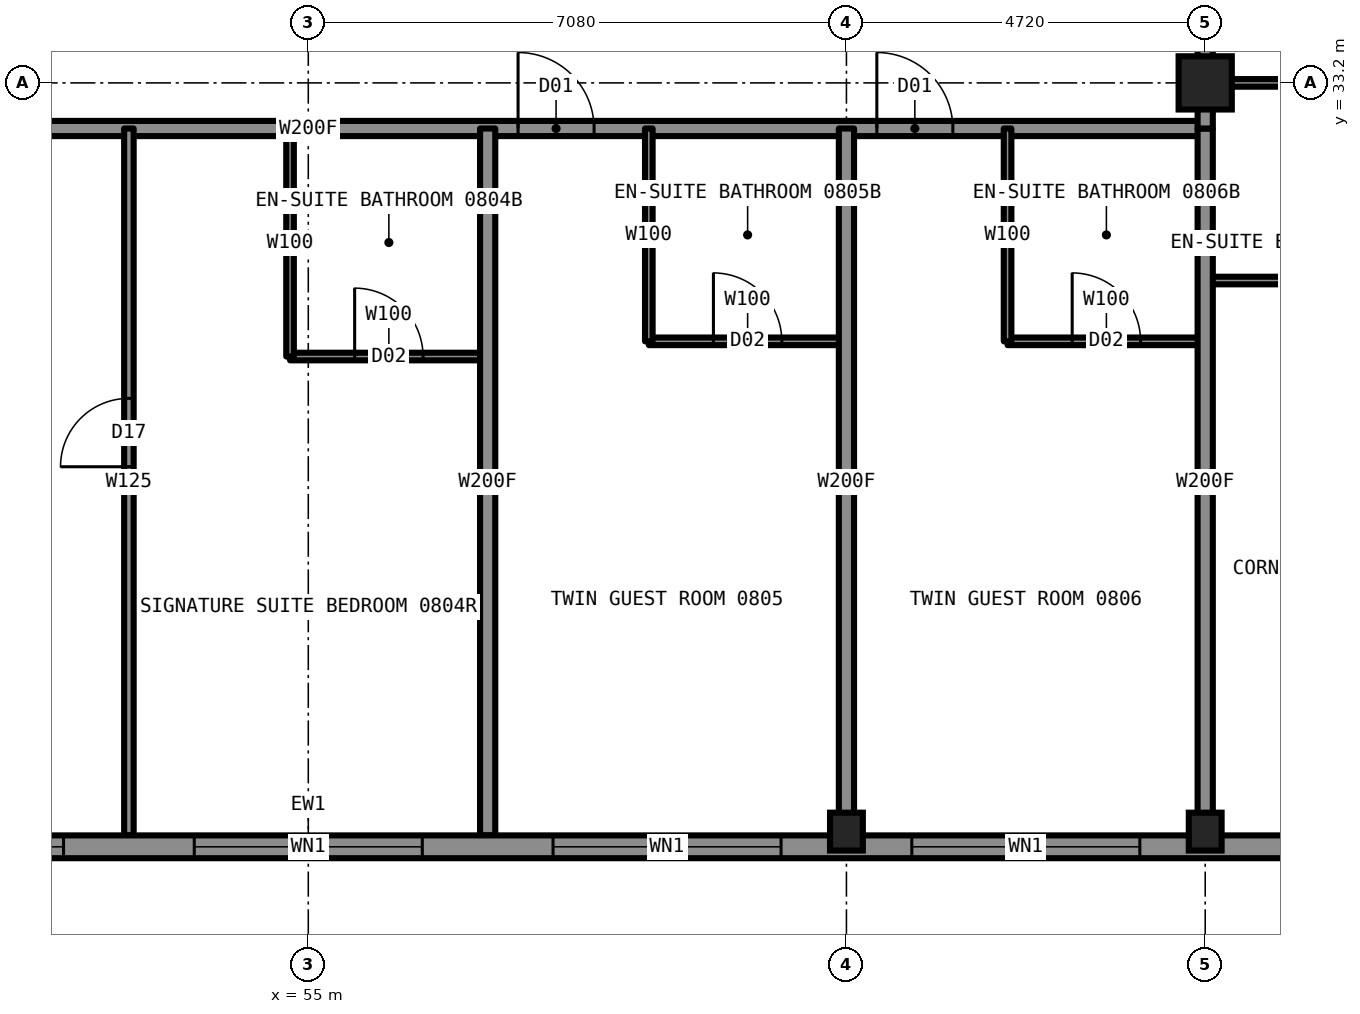
"""IFC4 building model, lengths in metres.
Left out: names, types, materials, properties, quantities, classifications, styles, units other than length and angle.
Written with IfcOpenShell. Run it as: python <this file> out.ifc"""

import sys

from ifc_helpers import new_model, si_unit, direction, frame, frame_2d, origin, origin_2d, place, context, subcontext, project, spatial, rectangle, hollow_rectangle, i_section, extrude, element, fill, save


model = new_model("IFC4")
c1 = context("Model", 3, precision=1e-05, world=origin(), true_north=direction((0.0, 1.0)))
c2 = subcontext(c1, "Body", "Model", "MODEL_VIEW")
j1 = project(units=[si_unit("LENGTHUNIT", "METRE"), si_unit("PLANEANGLEUNIT", "RADIAN")], contexts=[c1])
p1 = place(None, origin())
s1 = spatial("IfcSite", under=j1, at=p1, CompositionType="ELEMENT")
p2 = place(p1, origin())
s2 = spatial("IfcBuilding", under=s1, at=p2, CompositionType="ELEMENT")
p3 = place(p2, frame((0.0, 0.0, 28.5)))
s3 = spatial("IfcBuildingStorey", under=s2, at=p3, CompositionType="ELEMENT", Elevation=28.5)
for number, where, z_axis, x_axis in (
    (1, (62.08, 23.35, 0.0), (0.0, 0.0, 1.0), (1.0, 0.0, 0.0)),
    (2, (66.8, 23.35, 0.0), (0.0, 0.0, 1.0), (1.0, 0.0, 0.0)),
):
    element("IfcColumn", number, at=place(p3, frame(where, z_axis=z_axis, x_axis=x_axis)), inside=s3, PredefinedType="COLUMN", context=c2, shape_type="SweptSolid", body=[
        extrude(i_section(OverallWidth=0.432, OverallDepth=0.498, WebThickness=0.056, FlangeThickness=0.089, at=origin_2d()), origin(), (0.0, 0.0, 1.0), 3.5),
    ])
p4 = place(p3, frame((66.8, 33.2, 0.0), z_axis=(0.0, 0.0, 1.0), x_axis=(1.0, 0.0, 0.0)))
e3 = element("IfcColumn", 3, at=p4, inside=s3, PredefinedType="COLUMN", context=c2, shape_type="SweptSolid", body=[
    extrude(hollow_rectangle(XDim=0.7, YDim=0.7, WallThickness=0.06, at=origin_2d()), origin(), (0.0, 0.0, 1.0), 3.5),
])
p5 = place(p3, frame((66.8, 33.2, 0.0), z_axis=(0.0, 0.0, 1.0), x_axis=(1.0, 0.0, 0.0)))
e4 = element("IfcWall", 4, at=p5, inside=s3, PredefinedType="PARTITIONING", context=c2, shape_type="SweptSolid", body=[
    extrude(rectangle(XDim=2.6, YDim=0.1, at=frame_2d((1.3, 0.0))), origin(), (0.0, 0.0, 1.0), 2.573),
])
p6 = place(p3, frame((43.2, 32.6, 0.0), z_axis=(0.0, 0.0, 1.0), x_axis=(1.0, 0.0, 0.0)))
e5 = element("IfcWall", 5, at=p6, inside=s3, PredefinedType="PARTITIONING", context=c2, shape_type="SweptSolid", body=[
    extrude(rectangle(XDim=23.6, YDim=0.2, at=frame_2d((11.8, 0.0))), origin(), (0.0, 0.0, 1.0), 3.33),
])
p7 = place(p6, frame((1.85, 0.0, 0.0)))
e6 = element("IfcOpeningElement", 6, at=p7, cuts=e5, PredefinedType="OPENING", context=c2, shape_type="SweptSolid", body=[
    extrude(rectangle(XDim=1.1, YDim=2.2, at=frame_2d((0.55, 1.1))), frame((0.0, 0.11, 0.0), z_axis=(0.0, -1.0, 0.0), x_axis=(1.0, 0.0, 0.0)), (0.0, 0.0, 1.0), 0.22),
])
p8 = place(p6, frame((14.56, 0.0, 0.0)))
e7 = element("IfcOpeningElement", 7, at=p8, cuts=e5, PredefinedType="OPENING", context=c2, shape_type="SweptSolid", body=[
    extrude(rectangle(XDim=1.0, YDim=2.2, at=frame_2d((0.5, 1.1))), frame((0.0, 0.11, 0.0), z_axis=(0.0, -1.0, 0.0), x_axis=(1.0, 0.0, 0.0)), (0.0, 0.0, 1.0), 0.22),
])
p9 = place(p6, frame((19.28, 0.0, 0.0)))
e8 = element("IfcOpeningElement", 8, at=p9, cuts=e5, PredefinedType="OPENING", context=c2, shape_type="SweptSolid", body=[
    extrude(rectangle(XDim=1.0, YDim=2.2, at=frame_2d((0.5, 1.1))), frame((0.0, 0.11, 0.0), z_axis=(0.0, -1.0, 0.0), x_axis=(1.0, 0.0, 0.0)), (0.0, 0.0, 1.0), 0.22),
])
p10 = place(p3, frame((66.8, 30.6, 0.0), z_axis=(0.0, 0.0, 1.0), x_axis=(1.0, 0.0, 0.0)))
e9 = element("IfcWall", 9, at=p10, inside=s3, PredefinedType="PARTITIONING", context=c2, shape_type="SweptSolid", body=[
    extrude(rectangle(XDim=2.6, YDim=0.1, at=frame_2d((1.3, 0.0))), origin(), (0.0, 0.0, 1.0), 3.33),
])
p11 = place(p3, frame((59.48, 29.8, 0.0), z_axis=(0.0, 0.0, 1.0), x_axis=(1.0, 0.0, 0.0)))
e10 = element("IfcWall", 10, at=p11, inside=s3, PredefinedType="PARTITIONING", context=c2, shape_type="SweptSolid", body=[
    extrude(rectangle(XDim=2.6, YDim=0.1, at=frame_2d((1.3, 0.0))), origin(), (0.0, 0.0, 1.0), 3.33),
])
p12 = place(p11, frame((0.85, 0.0, 0.0)))
e11 = element("IfcOpeningElement", 11, at=p12, cuts=e10, PredefinedType="OPENING", context=c2, shape_type="SweptSolid", body=[
    extrude(rectangle(XDim=0.9, YDim=2.1, at=frame_2d((0.45, 1.05))), frame((0.0, 0.06, 0.0), z_axis=(0.0, -1.0, 0.0), x_axis=(1.0, 0.0, 0.0)), (0.0, 0.0, 1.0), 0.12),
])
p13 = place(p3, frame((64.2, 29.8, 0.0), z_axis=(0.0, 0.0, 1.0), x_axis=(1.0, 0.0, 0.0)))
e12 = element("IfcWall", 12, at=p13, inside=s3, PredefinedType="PARTITIONING", context=c2, shape_type="SweptSolid", body=[
    extrude(rectangle(XDim=2.6, YDim=0.1, at=frame_2d((1.3, 0.0))), origin(), (0.0, 0.0, 1.0), 3.33),
])
p14 = place(p13, frame((0.85, 0.0, 0.0)))
e13 = element("IfcOpeningElement", 13, at=p14, cuts=e12, PredefinedType="OPENING", context=c2, shape_type="SweptSolid", body=[
    extrude(rectangle(XDim=0.9, YDim=2.1, at=frame_2d((0.45, 1.05))), frame((0.0, 0.06, 0.0), z_axis=(0.0, -1.0, 0.0), x_axis=(1.0, 0.0, 0.0)), (0.0, 0.0, 1.0), 0.12),
])
p15 = place(p3, frame((54.76, 29.6, 0.0), z_axis=(0.0, 0.0, 1.0), x_axis=(1.0, 0.0, 0.0)))
e14 = element("IfcWall", 14, at=p15, inside=s3, PredefinedType="PARTITIONING", context=c2, shape_type="SweptSolid", body=[
    extrude(rectangle(XDim=2.6, YDim=0.1, at=frame_2d((1.3, 0.0))), origin(), (0.0, 0.0, 1.0), 3.33),
])
p16 = place(p15, frame((0.85, 0.0, 0.0)))
e15 = element("IfcOpeningElement", 15, at=p16, cuts=e14, PredefinedType="OPENING", context=c2, shape_type="SweptSolid", body=[
    extrude(rectangle(XDim=0.9, YDim=2.1, at=frame_2d((0.45, 1.05))), frame((0.0, 0.06, 0.0), z_axis=(0.0, -1.0, 0.0), x_axis=(1.0, 0.0, 0.0)), (0.0, 0.0, 1.0), 0.12),
])
p17 = place(p3, frame((54.76, 29.6, 0.0), z_axis=(0.0, 0.0, 1.0), x_axis=(0.0, 1.0, 0.0)))
e16 = element("IfcWall", 16, at=p17, inside=s3, PredefinedType="PARTITIONING", context=c2, shape_type="SweptSolid", body=[
    extrude(rectangle(XDim=3.0, YDim=0.1, at=frame_2d((1.5, 0.0))), origin(), (0.0, 0.0, 1.0), 3.33),
])
p18 = place(p3, frame((52.64, 23.3, 0.0), z_axis=(0.0, 0.0, 1.0), x_axis=(0.0, 1.0, 0.0)))
e17 = element("IfcWall", 17, at=p18, inside=s3, PredefinedType="PARTITIONING", context=c2, shape_type="SweptSolid", body=[
    extrude(rectangle(XDim=9.3, YDim=0.125, at=frame_2d((4.65, 0.0))), origin(), (0.0, 0.0, 1.0), 3.33),
])
p19 = place(p18, frame((4.85, 0.0, 0.0)))
e18 = element("IfcOpeningElement", 18, at=p19, cuts=e17, PredefinedType="OPENING", context=c2, shape_type="SweptSolid", body=[
    extrude(rectangle(XDim=0.9, YDim=2.2, at=frame_2d((0.45, 1.1))), frame((0.0, 0.073, 0.0), z_axis=(0.0, -1.0, 0.0), x_axis=(1.0, 0.0, 0.0)), (0.0, 0.0, 1.0), 0.145),
])
p20 = place(p3, frame((66.8, 33.22, 0.0), z_axis=(0.0, 0.0, 1.0), x_axis=(0.0, 1.0, 0.0)))
e19 = element("IfcWall", 19, at=p20, inside=s3, PredefinedType="PARTITIONING", context=c2, shape_type="SweptSolid", body=[
    extrude(rectangle(XDim=23.56, YDim=0.2, at=frame_2d((11.78, 0.0))), origin(), (0.0, 0.0, 1.0), 3.33),
])
p21 = place(p20, frame((7.85, 0.0, 0.0)))
e20 = element("IfcOpeningElement", 20, at=p21, cuts=e19, PredefinedType="OPENING", context=c2, shape_type="SweptSolid", body=[
    extrude(rectangle(XDim=1.0, YDim=2.2, at=frame_2d((0.5, 1.1))), frame((0.0, 0.11, 0.0), z_axis=(0.0, -1.0, 0.0), x_axis=(1.0, 0.0, 0.0)), (0.0, 0.0, 1.0), 0.22),
])
p22 = place(p20, frame((12.42, 0.0, 0.0)))
e21 = element("IfcOpeningElement", 21, at=p22, cuts=e19, PredefinedType="OPENING", context=c2, shape_type="SweptSolid", body=[
    extrude(rectangle(XDim=1.0, YDim=2.2, at=frame_2d((0.5, 1.1))), frame((0.0, 0.11, 0.0), z_axis=(0.0, -1.0, 0.0), x_axis=(1.0, 0.0, 0.0)), (0.0, 0.0, 1.0), 0.22),
])
p23 = place(p20, frame((21.83, 0.0, 0.0)))
e22 = element("IfcOpeningElement", 22, at=p23, cuts=e19, PredefinedType="OPENING", context=c2, shape_type="SweptSolid", body=[
    extrude(rectangle(XDim=1.1, YDim=2.2, at=frame_2d((0.55, 1.1))), frame((0.0, 0.11, 0.0), z_axis=(0.0, -1.0, 0.0), x_axis=(1.0, 0.0, 0.0)), (0.0, 0.0, 1.0), 0.22),
])
p24 = place(p20, frame((0.63, 0.0, 0.0)))
e23 = element("IfcOpeningElement", 23, at=p24, cuts=e19, PredefinedType="OPENING", context=c2, shape_type="SweptSolid", body=[
    extrude(rectangle(XDim=1.1, YDim=2.2, at=frame_2d((0.55, 1.1))), frame((0.0, 0.11, 0.0), z_axis=(0.0, -1.0, 0.0), x_axis=(1.0, 0.0, 0.0)), (0.0, 0.0, 1.0), 0.22),
])
p25 = place(p3, frame((66.8, 23.3, 0.0), z_axis=(0.0, 0.0, 1.0), x_axis=(0.0, 1.0, 0.0)))
e24 = element("IfcWall", 24, at=p25, inside=s3, PredefinedType="PARTITIONING", context=c2, shape_type="SweptSolid", body=[
    extrude(rectangle(XDim=9.3, YDim=0.2, at=frame_2d((4.65, 0.0))), origin(), (0.0, 0.0, 1.0), 2.573),
])
p26 = place(p3, frame((57.36, 23.3, 0.0), z_axis=(0.0, 0.0, 1.0), x_axis=(0.0, 1.0, 0.0)))
e25 = element("IfcWall", 25, at=p26, inside=s3, PredefinedType="PARTITIONING", context=c2, shape_type="SweptSolid", body=[
    extrude(rectangle(XDim=9.3, YDim=0.2, at=frame_2d((4.65, 0.0))), origin(), (0.0, 0.0, 1.0), 3.33),
])
p27 = place(p3, frame((59.48, 29.8, 0.0), z_axis=(0.0, 0.0, 1.0), x_axis=(0.0, 1.0, 0.0)))
e26 = element("IfcWall", 26, at=p27, inside=s3, PredefinedType="PARTITIONING", context=c2, shape_type="SweptSolid", body=[
    extrude(rectangle(XDim=2.8, YDim=0.1, at=frame_2d((1.4, 0.0))), origin(), (0.0, 0.0, 1.0), 3.33),
])
p28 = place(p3, frame((62.08, 23.3, 0.0), z_axis=(0.0, 0.0, 1.0), x_axis=(0.0, 1.0, 0.0)))
e27 = element("IfcWall", 27, at=p28, inside=s3, PredefinedType="PARTITIONING", context=c2, shape_type="SweptSolid", body=[
    extrude(rectangle(XDim=9.3, YDim=0.2, at=frame_2d((4.65, 0.0))), origin(), (0.0, 0.0, 1.0), 2.573),
])
p29 = place(p3, frame((64.2, 29.8, 0.0), z_axis=(0.0, 0.0, 1.0), x_axis=(0.0, 1.0, 0.0)))
e28 = element("IfcWall", 28, at=p29, inside=s3, PredefinedType="PARTITIONING", context=c2, shape_type="SweptSolid", body=[
    extrude(rectangle(XDim=2.8, YDim=0.1, at=frame_2d((1.4, 0.0))), origin(), (0.0, 0.0, 1.0), 3.33),
])
p30 = place(p3, frame((38.5, 23.15, 0.0), z_axis=(0.0, 0.0, 1.0), x_axis=(1.0, 0.0, 0.0)))
e29 = element("IfcWall", 29, at=p30, inside=s3, PredefinedType="SOLIDWALL", context=c2, shape_type="SweptSolid", body=[
    extrude(rectangle(XDim=33.0, YDim=0.3, at=frame_2d((16.5, 0.0))), origin(), (0.0, 0.0, 1.0), 2.83),
])
p31 = place(p30, frame((0.85, 0.0, 0.5)))
e30 = element("IfcOpeningElement", 30, at=p31, cuts=e29, PredefinedType="OPENING", context=c2, shape_type="SweptSolid", body=[
    extrude(rectangle(XDim=3.0, YDim=2.0, at=frame_2d((1.5, 1.0))), frame((0.0, 0.16, 0.0), z_axis=(0.0, -1.0, 0.0), x_axis=(1.0, 0.0, 0.0)), (0.0, 0.0, 1.0), 0.32),
])
p32 = place(p30, frame((5.56, 0.0, 0.5)))
e31 = element("IfcOpeningElement", 31, at=p32, cuts=e29, PredefinedType="OPENING", context=c2, shape_type="SweptSolid", body=[
    extrude(rectangle(XDim=3.0, YDim=2.0, at=frame_2d((1.5, 1.0))), frame((0.0, 0.16, 0.0), z_axis=(0.0, -1.0, 0.0), x_axis=(1.0, 0.0, 0.0)), (0.0, 0.0, 1.0), 0.32),
])
p33 = place(p30, frame((10.28, 0.0, 0.5)))
e32 = element("IfcOpeningElement", 32, at=p33, cuts=e29, PredefinedType="OPENING", context=c2, shape_type="SweptSolid", body=[
    extrude(rectangle(XDim=3.0, YDim=2.0, at=frame_2d((1.5, 1.0))), frame((0.0, 0.16, 0.0), z_axis=(0.0, -1.0, 0.0), x_axis=(1.0, 0.0, 0.0)), (0.0, 0.0, 1.0), 0.32),
])
p34 = place(p30, frame((15.0, 0.0, 0.5)))
e33 = element("IfcOpeningElement", 33, at=p34, cuts=e29, PredefinedType="OPENING", context=c2, shape_type="SweptSolid", body=[
    extrude(rectangle(XDim=3.0, YDim=2.0, at=frame_2d((1.5, 1.0))), frame((0.0, 0.16, 0.0), z_axis=(0.0, -1.0, 0.0), x_axis=(1.0, 0.0, 0.0)), (0.0, 0.0, 1.0), 0.32),
])
p35 = place(p30, frame((19.72, 0.0, 0.5)))
e34 = element("IfcOpeningElement", 34, at=p35, cuts=e29, PredefinedType="OPENING", context=c2, shape_type="SweptSolid", body=[
    extrude(rectangle(XDim=3.0, YDim=2.0, at=frame_2d((1.5, 1.0))), frame((0.0, 0.16, 0.0), z_axis=(0.0, -1.0, 0.0), x_axis=(1.0, 0.0, 0.0)), (0.0, 0.0, 1.0), 0.32),
])
p36 = place(p30, frame((24.44, 0.0, 0.5)))
e35 = element("IfcOpeningElement", 35, at=p36, cuts=e29, PredefinedType="OPENING", context=c2, shape_type="SweptSolid", body=[
    extrude(rectangle(XDim=3.0, YDim=2.0, at=frame_2d((1.5, 1.0))), frame((0.0, 0.16, 0.0), z_axis=(0.0, -1.0, 0.0), x_axis=(1.0, 0.0, 0.0)), (0.0, 0.0, 1.0), 0.32),
])
p37 = place(p30, frame((29.15, 0.0, 0.5)))
e36 = element("IfcOpeningElement", 36, at=p37, cuts=e29, PredefinedType="OPENING", context=c2, shape_type="SweptSolid", body=[
    extrude(rectangle(XDim=3.0, YDim=2.0, at=frame_2d((1.5, 1.0))), frame((0.0, 0.16, 0.0), z_axis=(0.0, -1.0, 0.0), x_axis=(1.0, 0.0, 0.0)), (0.0, 0.0, 1.0), 0.32),
])
p38 = place(p3, frame((66.8, 32.6, 0.0), z_axis=(0.0, 0.0, 1.0), x_axis=(0.0, 1.0, 0.0)))
e37 = element("IfcWall", 37, at=p38, inside=s3, PredefinedType="PARTITIONING", context=c2, shape_type="SweptSolid", body=[
    extrude(rectangle(XDim=0.62, YDim=0.2, at=frame_2d((0.31, 0.0))), origin(), (0.0, 0.0, 1.0), 2.573),
])
p39 = place(p16, origin())
e38 = element("IfcDoor", 38, at=p39, inside=s3, OperationType="SINGLE_SWING_RIGHT", PredefinedType="DOOR", context=c2, shape_type="SweptSolid", body=[
    extrude(rectangle(XDim=0.9, YDim=2.1, at=frame_2d((0.45, 1.05))), frame((0.0, 0.025, 0.0), z_axis=(0.0, -1.0, 0.0), x_axis=(1.0, 0.0, 0.0)), (0.0, 0.0, 1.0), 0.05),
])
fill(e15, e38)
p40 = place(p19, origin())
e39 = element("IfcDoor", 39, at=p40, inside=s3, OperationType="SINGLE_SWING_LEFT", PredefinedType="DOOR", context=c2, shape_type="SweptSolid", body=[
    extrude(rectangle(XDim=0.9, YDim=2.2, at=frame_2d((0.45, 1.1))), frame((0.0, 0.025, 0.0), z_axis=(0.0, -1.0, 0.0), x_axis=(1.0, 0.0, 0.0)), (0.0, 0.0, 1.0), 0.05),
])
fill(e18, e39)
p41 = place(p8, origin())
e40 = element("IfcDoor", 40, at=p41, inside=s3, OperationType="SINGLE_SWING_LEFT", PredefinedType="DOOR", context=c2, shape_type="SweptSolid", body=[
    extrude(rectangle(XDim=1.0, YDim=2.2, at=frame_2d((0.5, 1.1))), frame((0.0, 0.025, 0.0), z_axis=(0.0, -1.0, 0.0), x_axis=(1.0, 0.0, 0.0)), (0.0, 0.0, 1.0), 0.05),
])
fill(e7, e40)
p42 = place(p12, origin())
e41 = element("IfcDoor", 41, at=p42, inside=s3, OperationType="SINGLE_SWING_RIGHT", PredefinedType="DOOR", context=c2, shape_type="SweptSolid", body=[
    extrude(rectangle(XDim=0.9, YDim=2.1, at=frame_2d((0.45, 1.05))), frame((0.0, 0.025, 0.0), z_axis=(0.0, -1.0, 0.0), x_axis=(1.0, 0.0, 0.0)), (0.0, 0.0, 1.0), 0.05),
])
fill(e11, e41)
p43 = place(p9, origin())
e42 = element("IfcDoor", 42, at=p43, inside=s3, OperationType="SINGLE_SWING_LEFT", PredefinedType="DOOR", context=c2, shape_type="SweptSolid", body=[
    extrude(rectangle(XDim=1.0, YDim=2.2, at=frame_2d((0.5, 1.1))), frame((0.0, 0.025, 0.0), z_axis=(0.0, -1.0, 0.0), x_axis=(1.0, 0.0, 0.0)), (0.0, 0.0, 1.0), 0.05),
])
fill(e8, e42)
p44 = place(p14, origin())
e43 = element("IfcDoor", 43, at=p44, inside=s3, OperationType="SINGLE_SWING_RIGHT", PredefinedType="DOOR", context=c2, shape_type="SweptSolid", body=[
    extrude(rectangle(XDim=0.9, YDim=2.1, at=frame_2d((0.45, 1.05))), frame((0.0, 0.025, 0.0), z_axis=(0.0, -1.0, 0.0), x_axis=(1.0, 0.0, 0.0)), (0.0, 0.0, 1.0), 0.05),
])
fill(e13, e43)
p45 = place(p33, origin())
e44 = element("IfcWindow", 44, at=p45, inside=s3, PartitioningType="SINGLE_PANEL", PredefinedType="WINDOW", context=c2, shape_type="SweptSolid", body=[
    extrude(rectangle(XDim=3.0, YDim=2.0, at=frame_2d((1.5, 1.0))), frame((0.0, 0.03, 0.0), z_axis=(0.0, -1.0, 0.0), x_axis=(1.0, 0.0, 0.0)), (0.0, 0.0, 1.0), 0.06),
])
fill(e32, e44)
p46 = place(p34, origin())
e45 = element("IfcWindow", 45, at=p46, inside=s3, PartitioningType="SINGLE_PANEL", PredefinedType="WINDOW", context=c2, shape_type="SweptSolid", body=[
    extrude(rectangle(XDim=3.0, YDim=2.0, at=frame_2d((1.5, 1.0))), frame((0.0, 0.03, 0.0), z_axis=(0.0, -1.0, 0.0), x_axis=(1.0, 0.0, 0.0)), (0.0, 0.0, 1.0), 0.06),
])
fill(e33, e45)
p47 = place(p35, origin())
e46 = element("IfcWindow", 46, at=p47, inside=s3, PartitioningType="SINGLE_PANEL", PredefinedType="WINDOW", context=c2, shape_type="SweptSolid", body=[
    extrude(rectangle(XDim=3.0, YDim=2.0, at=frame_2d((1.5, 1.0))), frame((0.0, 0.03, 0.0), z_axis=(0.0, -1.0, 0.0), x_axis=(1.0, 0.0, 0.0)), (0.0, 0.0, 1.0), 0.06),
])
fill(e34, e46)
p48 = place(p36, origin())
e47 = element("IfcWindow", 47, at=p48, inside=s3, PartitioningType="SINGLE_PANEL", PredefinedType="WINDOW", context=c2, shape_type="SweptSolid", body=[
    extrude(rectangle(XDim=3.0, YDim=2.0, at=frame_2d((1.5, 1.0))), frame((0.0, 0.03, 0.0), z_axis=(0.0, -1.0, 0.0), x_axis=(1.0, 0.0, 0.0)), (0.0, 0.0, 1.0), 0.06),
])
fill(e35, e47)
p49 = place(p37, origin())
e48 = element("IfcWindow", 48, at=p49, inside=s3, PartitioningType="SINGLE_PANEL", PredefinedType="WINDOW", context=c2, shape_type="SweptSolid", body=[
    extrude(rectangle(XDim=3.0, YDim=2.0, at=frame_2d((1.5, 1.0))), frame((0.0, 0.03, 0.0), z_axis=(0.0, -1.0, 0.0), x_axis=(1.0, 0.0, 0.0)), (0.0, 0.0, 1.0), 0.06),
])
fill(e36, e48)
save(model, sys.argv[1])
